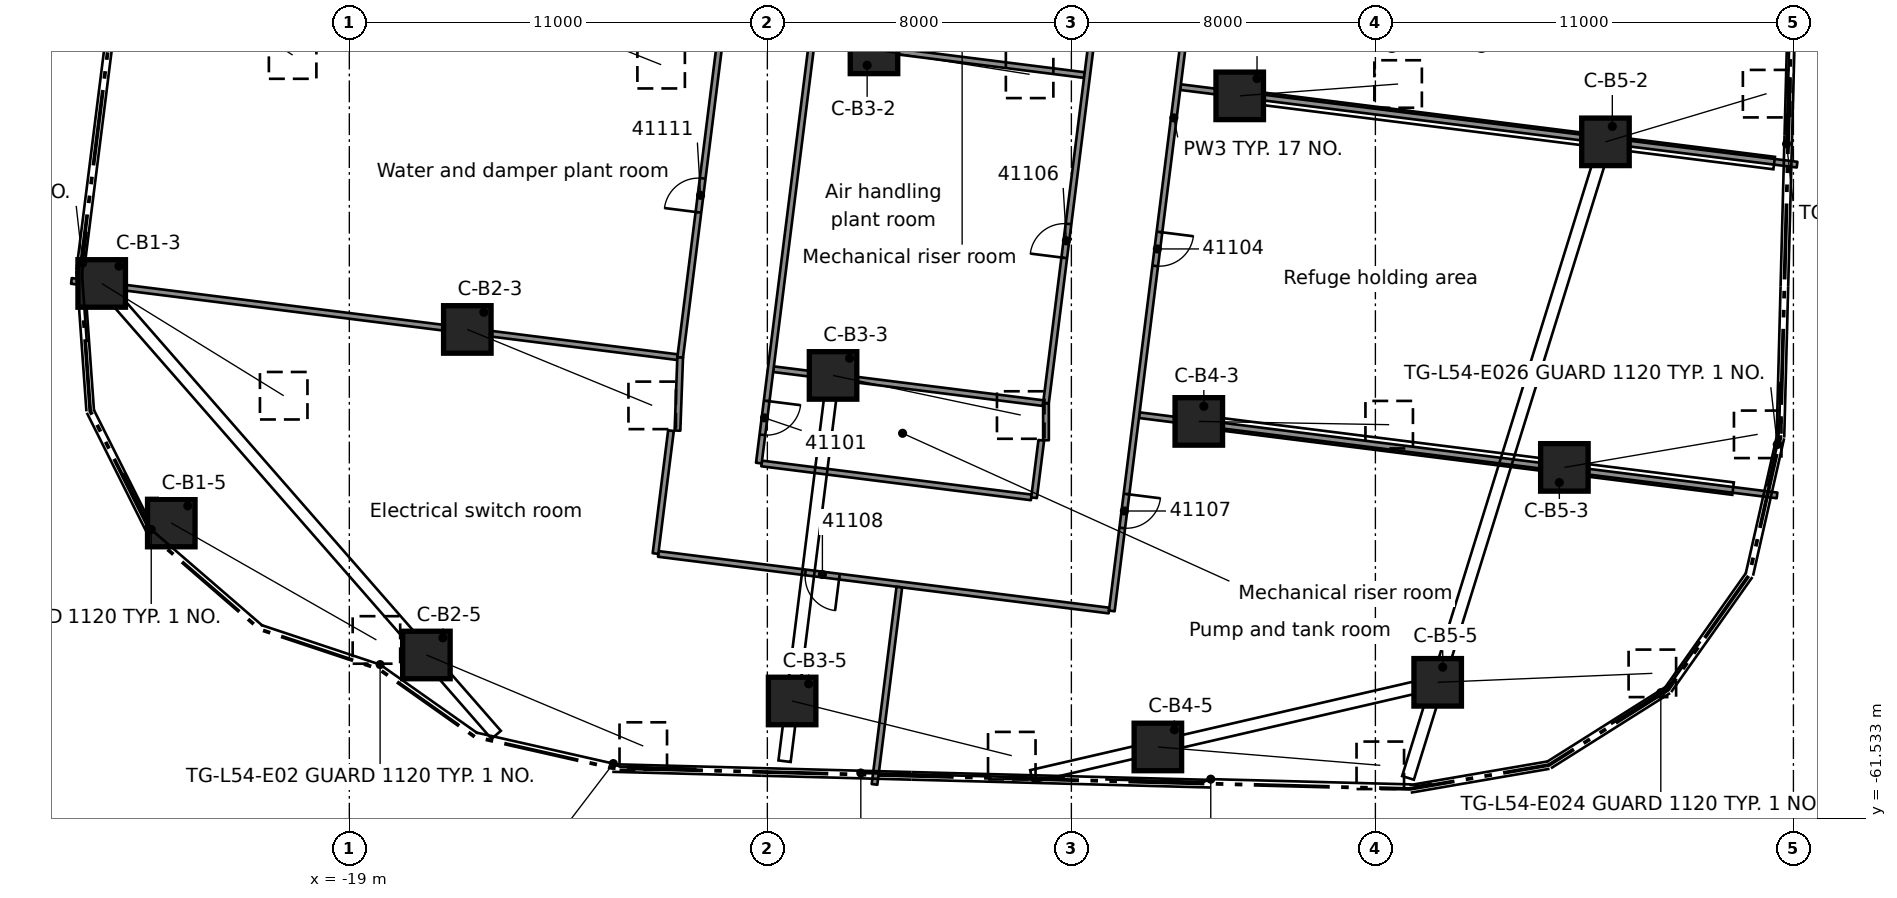
"""IFC4 building model, lengths in metres.
Left out: names, types, materials, properties, quantities, classifications, styles, units other than length and angle.
Written with IfcOpenShell. Run it as: python <this file> out.ifc"""

import sys

from ifc_helpers import new_model, si_unit, direction, frame, frame_2d, origin, origin_2d, place, context, subcontext, project, spatial, rectangle, extrude, element, fill, save


model = new_model("IFC4")
c1 = context("Model", 3, precision=1e-05, world=origin(), true_north=direction((0.0, 1.0)))
c2 = subcontext(c1, "Body", "Model", "MODEL_VIEW")
j1 = project(units=[si_unit("LENGTHUNIT", "METRE"), si_unit("PLANEANGLEUNIT", "RADIAN")], contexts=[c1])
p1 = place(None, origin())
s1 = spatial("IfcSite", under=j1, at=p1, CompositionType="ELEMENT")
p2 = place(p1, origin())
s2 = spatial("IfcBuilding", under=s1, at=p2, CompositionType="ELEMENT")
p3 = place(p2, frame((0.0, 0.0, 206.1)))
s3 = spatial("IfcBuildingStorey", under=s2, at=p3, CompositionType="ELEMENT", Elevation=206.1)
p4 = place(p3, frame((-24.442, -38.888, 0.507), z_axis=(0.681472154292, -0.44100460198, 0.584046782336), x_axis=(0.543296460318, 0.839540919912, 0.0)))
e1 = element("IfcColumn", 1, at=p4, inside=s3, PredefinedType="COLUMN", context=c2, shape_type="SweptSolid", body=[
    extrude(rectangle(XDim=1.25, YDim=1.25, at=origin_2d()), origin(), (0.0, 0.0, 1.0), 5.796),
])
p5 = place(p3, frame((-25.516, -47.454, 0.538), z_axis=(0.732821218952, -0.451998568928, 0.50859645569), x_axis=(0.524966240831, 0.851123049851, 0.0)))
e2 = element("IfcColumn", 2, at=p5, inside=s3, PredefinedType="COLUMN", context=c2, shape_type="SweptSolid", body=[
    extrude(rectangle(XDim=1.25, YDim=1.25, at=origin_2d()), origin(), (0.0, 0.0, 1.0), 6.535),
])
p6 = place(p3, frame((-23.685, -53.758, 0.552), z_axis=(0.767524718549, -0.437360648077, 0.468637887852), x_axis=(0.495093298887, 0.86883981573, 0.0)))
e3 = element("IfcColumn", 3, at=p6, inside=s3, PredefinedType="COLUMN", context=c2, shape_type="SweptSolid", body=[
    extrude(rectangle(XDim=1.25, YDim=1.25, at=origin_2d()), origin(), (0.0, 0.0, 1.0), 7.033),
])
p7 = place(p3, frame((-14.818, -40.098, 0.49), z_axis=(0.729256121649, -0.29003851091, 0.619728304361), x_axis=(0.369562231152, 0.929205982173, 0.0)))
e4 = element("IfcColumn", 4, at=p7, inside=s3, PredefinedType="COLUMN", context=c2, shape_type="SweptSolid", body=[
    extrude(rectangle(XDim=1.25, YDim=1.25, at=origin_2d()), origin(), (0.0, 0.0, 1.0), 5.517),
])
p8 = place(p3, frame((-15.895, -48.664, 0.527), z_axis=(0.780516487065, -0.320557380948, 0.536690766587), x_axis=(0.379906795969, 0.925024770683, 0.0)))
e5 = element("IfcColumn", 5, at=p8, inside=s3, PredefinedType="COLUMN", context=c2, shape_type="SweptSolid", body=[
    extrude(rectangle(XDim=1.25, YDim=1.25, at=origin_2d()), origin(), (0.0, 0.0, 1.0), 6.233),
])
p9 = place(p3, frame((-16.972, -57.23, 0.552), z_axis=(0.813793611943, -0.34165684923, 0.470117596495), x_axis=(0.387101045931, 0.922037298724, 0.0)))
e6 = element("IfcColumn", 6, at=p9, inside=s3, PredefinedType="COLUMN", context=c2, shape_type="SweptSolid", body=[
    extrude(rectangle(XDim=1.25, YDim=1.25, at=origin_2d()), origin(), (0.0, 0.0, 1.0), 7.013),
])
p10 = place(p3, frame((-5.194, -41.308, 0.481), z_axis=(0.760399313184, -0.119547665228, 0.638358238177), x_axis=(0.155309269124, 0.987865897237, 0.0)))
e7 = element("IfcColumn", 7, at=p10, inside=s3, PredefinedType="COLUMN", context=c2, shape_type="SweptSolid", body=[
    extrude(rectangle(XDim=1.25, YDim=1.25, at=origin_2d()), origin(), (0.0, 0.0, 1.0), 5.385),
])
p11 = place(p3, frame((-6.271, -49.874, 0.52), z_axis=(0.814502781534, -0.171872731711, 0.554116398393), x_axis=(0.206468811523, 0.978453182257, 0.0)))
e8 = element("IfcColumn", 8, at=p11, inside=s3, PredefinedType="COLUMN", context=c2, shape_type="SweptSolid", body=[
    extrude(rectangle(XDim=1.25, YDim=1.25, at=origin_2d()), origin(), (0.0, 0.0, 1.0), 6.062),
])
p12 = place(p3, frame((-7.348, -58.44, 0.546), z_axis=(0.84837700883, -0.211216274818, 0.485431906801), x_axis=(0.241590347194, 0.970378330417, 0.0)))
e9 = element("IfcColumn", 9, at=p12, inside=s3, PredefinedType="COLUMN", context=c2, shape_type="SweptSolid", body=[
    extrude(rectangle(XDim=1.25, YDim=1.25, at=origin_2d()), origin(), (0.0, 0.0, 1.0), 6.813),
])
p13 = place(p3, frame((4.43, -42.518, 0.483), z_axis=(0.770496575996, 0.057678925968, 0.634829243086), x_axis=(-0.074650542849, 0.997209755494, 0.0)))
e10 = element("IfcColumn", 10, at=p13, inside=s3, PredefinedType="COLUMN", context=c2, shape_type="SweptSolid", body=[
    extrude(rectangle(XDim=1.25, YDim=1.25, at=origin_2d()), origin(), (0.0, 0.0, 1.0), 5.409),
])
p14 = place(p3, frame((3.353, -51.084, 0.519), z_axis=(0.830275198179, -0.014241843466, 0.557171665812), x_axis=(0.017150637239, 0.999852917004, 0.0)))
e11 = element("IfcColumn", 11, at=p14, inside=s3, PredefinedType="COLUMN", context=c2, shape_type="SweptSolid", body=[
    extrude(rectangle(XDim=1.25, YDim=1.25, at=origin_2d()), origin(), (0.0, 0.0, 1.0), 6.034),
])
p15 = place(p3, frame((2.276, -59.65, 0.544), z_axis=(0.868130955157, -0.071662265799, 0.491134568482), x_axis=(0.082267943599, 0.996610247517, 0.0)))
e12 = element("IfcColumn", 12, at=p15, inside=s3, PredefinedType="COLUMN", context=c2, shape_type="SweptSolid", body=[
    extrude(rectangle(XDim=1.25, YDim=1.25, at=origin_2d()), origin(), (0.0, 0.0, 1.0), 6.742),
])
p16 = place(p3, frame((14.054, -43.728, 0.495), z_axis=(0.759016145733, 0.22694892988, 0.610236571948), x_axis=(-0.286472377914, 0.958088501492, 0.0)))
e13 = element("IfcColumn", 13, at=p16, inside=s3, PredefinedType="COLUMN", context=c2, shape_type="SweptSolid", body=[
    extrude(rectangle(XDim=1.25, YDim=1.25, at=origin_2d()), origin(), (0.0, 0.0, 1.0), 5.587),
])
p17 = place(p3, frame((12.973, -52.294, 0.524), z_axis=(0.826674052824, 0.141356224515, 0.544636051119), x_axis=(-0.168547583894, 0.985693518272, 0.0)))
e14 = element("IfcColumn", 14, at=p17, inside=s3, PredefinedType="COLUMN", context=c2, shape_type="SweptSolid", body=[
    extrude(rectangle(XDim=1.25, YDim=1.25, at=origin_2d()), origin(), (0.0, 0.0, 1.0), 6.154),
])
p18 = place(p3, frame((9.639, -57.949, 0.539), z_axis=(0.86142718096, 0.035999830761, 0.50660361634), x_axis=(-0.041754469989, 0.99912790184, 0.0)))
e15 = element("IfcColumn", 15, at=p18, inside=s3, PredefinedType="COLUMN", context=c2, shape_type="SweptSolid", body=[
    extrude(rectangle(XDim=1.25, YDim=1.25, at=origin_2d()), origin(), (0.0, 0.0, 1.0), 6.558),
])
p19 = place(p3, frame((0.989, -56.06, 0.0), z_axis=(0.0, 0.0, 1.0), x_axis=(-0.992206680217, 0.124602984447, 0.0)))
e16 = element("IfcWall", 16, at=p19, inside=s3, PredefinedType="PARTITIONING", context=c2, shape_type="SweptSolid", body=[
    extrude(rectangle(XDim=11.95, YDim=0.15, at=frame_2d((5.975, 0.0))), origin(), (0.0, 0.0, 1.0), 3.98),
])
p20 = place(p19, frame((7.15, 0.0, 0.0)))
e17 = element("IfcOpeningElement", 17, at=p20, cuts=e16, PredefinedType="OPENING", context=c2, shape_type="SweptSolid", body=[
    extrude(rectangle(XDim=0.9, YDim=2.1, at=frame_2d((0.45, 1.05))), frame((0.0, 0.085, 0.0), z_axis=(0.0, -1.0, 0.0), x_axis=(1.0, 0.0, 0.0)), (0.0, 0.0, 1.0), 0.17),
])
p21 = place(p3, frame((-8.15, -52.19, 0.0), z_axis=(0.0, 0.0, 1.0), x_axis=(0.992168754775, -0.124904611796, 0.0)))
e18 = element("IfcWall", 18, at=p21, inside=s3, PredefinedType="PARTITIONING", context=c2, shape_type="SweptSolid", body=[
    extrude(rectangle(XDim=7.15, YDim=0.15, at=frame_2d((3.575, 0.0))), origin(), (0.0, 0.0, 1.0), 3.98),
])
p22 = place(p3, frame((-26.313, -47.387, 0.0), z_axis=(0.0, 0.0, 1.0), x_axis=(0.992178228876, -0.124829332068, 0.0)))
e19 = element("IfcWall", 19, at=p22, inside=s3, PredefinedType="PARTITIONING", context=c2, shape_type="SweptSolid", body=[
    extrude(rectangle(XDim=16.071, YDim=0.15, at=frame_2d((8.035, 0.0))), origin(), (0.0, 0.0, 1.0), 3.98),
])
p23 = place(p3, frame((-7.838, -49.71, 0.0), z_axis=(0.0, 0.0, 1.0), x_axis=(0.992173014732, -0.124870768549, 0.0)))
e20 = element("IfcWall", 20, at=p23, inside=s3, PredefinedType="PARTITIONING", context=c2, shape_type="SweptSolid", body=[
    extrude(rectangle(XDim=7.152, YDim=0.15, at=frame_2d((3.576, 0.0))), origin(), (0.0, 0.0, 1.0), 3.98),
])
p24 = place(p3, frame((1.787, -50.92, 0.0), z_axis=(0.0, 0.0, 1.0), x_axis=(0.992180531957, -0.12481102518, 0.0)))
e21 = element("IfcWall", 21, at=p24, inside=s3, PredefinedType="PARTITIONING", context=c2, shape_type="SweptSolid", body=[
    extrude(rectangle(XDim=16.914, YDim=0.15, at=frame_2d((8.457, 0.0))), origin(), (0.0, 0.0, 1.0), 3.98),
])
p25 = place(p3, frame((-6.752, -41.078, 0.0), z_axis=(0.0, 0.0, 1.0), x_axis=(0.992168754775, -0.124904611796, 0.0)))
e22 = element("IfcWall", 22, at=p25, inside=s3, PredefinedType="PARTITIONING", context=c2, shape_type="SweptSolid", body=[
    extrude(rectangle(XDim=7.15, YDim=0.15, at=frame_2d((3.575, 0.0))), origin(), (0.0, 0.0, 1.0), 3.98),
])
p26 = place(p3, frame((2.872, -42.288, 0.0), z_axis=(0.0, 0.0, 1.0), x_axis=(0.992188726877, -0.124745862686, 0.0)))
e23 = element("IfcWall", 23, at=p26, inside=s3, PredefinedType="PARTITIONING", context=c2, shape_type="SweptSolid", body=[
    extrude(rectangle(XDim=16.352, YDim=0.15, at=frame_2d((8.176, 0.0))), origin(), (0.0, 0.0, 1.0), 3.98),
])
p27 = place(p3, frame((-10.943, -54.561, 0.0), z_axis=(0.0, 0.0, 1.0), x_axis=(0.124928843821, 0.992165703893, 0.0)))
e24 = element("IfcWall", 24, at=p27, inside=s3, PredefinedType="PARTITIONING", context=c2, shape_type="SweptSolid", body=[
    extrude(rectangle(XDim=3.26, YDim=0.15, at=frame_2d((1.63, 0.0))), origin(), (0.0, 0.0, 1.0), 3.98),
])
p28 = place(p3, frame((4.328, -30.123, 0.0), z_axis=(0.0, 0.0, 1.0), x_axis=(-0.124803349917, -0.992181497434, 0.0)))
e25 = element("IfcWall", 25, at=p28, inside=s3, PredefinedType="PARTITIONING", context=c2, shape_type="SweptSolid", body=[
    extrude(rectangle(XDim=26.153, YDim=0.15, at=frame_2d((13.076, 0.0))), origin(), (0.0, 0.0, 1.0), 3.98),
])
p29 = place(p28, frame((2.946, 0.0, 0.0)))
e26 = element("IfcOpeningElement", 26, at=p29, cuts=e25, PredefinedType="OPENING", context=c2, shape_type="SweptSolid", body=[
    extrude(rectangle(XDim=0.9, YDim=2.1, at=frame_2d((0.45, 1.05))), frame((0.0, 0.085, 0.0), z_axis=(0.0, -1.0, 0.0), x_axis=(1.0, 0.0, 0.0)), (0.0, 0.0, 1.0), 0.17),
])
p30 = place(p28, frame((9.803, 0.0, 0.0)))
e27 = element("IfcOpeningElement", 27, at=p30, cuts=e25, PredefinedType="OPENING", context=c2, shape_type="SweptSolid", body=[
    extrude(rectangle(XDim=0.9, YDim=2.1, at=frame_2d((0.45, 1.05))), frame((0.0, 0.085, 0.0), z_axis=(0.0, -1.0, 0.0), x_axis=(1.0, 0.0, 0.0)), (0.0, 0.0, 1.0), 0.17),
])
p31 = place(p28, frame((16.102, 0.0, 0.0)))
e28 = element("IfcOpeningElement", 28, at=p31, cuts=e25, PredefinedType="OPENING", context=c2, shape_type="SweptSolid", body=[
    extrude(rectangle(XDim=0.9, YDim=2.1, at=frame_2d((0.45, 1.05))), frame((0.0, 0.085, 0.0), z_axis=(0.0, -1.0, 0.0), x_axis=(1.0, 0.0, 0.0)), (0.0, 0.0, 1.0), 0.17),
])
p32 = place(p28, frame((23.052, 0.0, 0.0)))
e29 = element("IfcOpeningElement", 29, at=p32, cuts=e25, PredefinedType="OPENING", context=c2, shape_type="SweptSolid", body=[
    extrude(rectangle(XDim=0.9, YDim=2.1, at=frame_2d((0.45, 1.05))), frame((0.0, 0.085, 0.0), z_axis=(0.0, -1.0, 0.0), x_axis=(1.0, 0.0, 0.0)), (0.0, 0.0, 1.0), 0.17),
])
p33 = place(p28, frame((0.2, 0.0, 0.0)))
e30 = element("IfcOpeningElement", 30, at=p33, cuts=e25, PredefinedType="OPENING", context=c2, shape_type="SweptSolid", body=[
    extrude(rectangle(XDim=0.9, YDim=2.1, at=frame_2d((0.45, 1.05))), frame((0.0, 0.085, 0.0), z_axis=(0.0, -1.0, 0.0), x_axis=(1.0, 0.0, 0.0)), (0.0, 0.0, 1.0), 0.17),
])
p34 = place(p3, frame((-0.982, -53.092, 0.0), z_axis=(0.0, 0.0, 1.0), x_axis=(0.12472529348, 0.992191312785, 0.0)))
e31 = element("IfcWall", 31, at=p34, inside=s3, PredefinedType="PARTITIONING", context=c2, shape_type="SweptSolid", body=[
    extrude(rectangle(XDim=1.523, YDim=0.15, at=frame_2d((0.761, 0.0))), origin(), (0.0, 0.0, 1.0), 3.98),
])
p35 = place(p3, frame((-0.668, -50.6, 0.0), z_axis=(0.0, 0.0, 1.0), x_axis=(0.124761144716, 0.99218680538, 0.0)))
e32 = element("IfcWall", 32, at=p35, inside=s3, PredefinedType="PARTITIONING", context=c2, shape_type="SweptSolid", body=[
    extrude(rectangle(XDim=17.745, YDim=0.15, at=frame_2d((8.873, 0.0))), origin(), (0.0, 0.0, 1.0), 3.98),
])
p36 = place(p35, frame((15.588, 0.0, 0.0)))
e33 = element("IfcOpeningElement", 33, at=p36, cuts=e32, PredefinedType="OPENING", context=c2, shape_type="SweptSolid", body=[
    extrude(rectangle(XDim=0.9, YDim=2.1, at=frame_2d((0.45, 1.05))), frame((0.0, 0.085, 0.0), z_axis=(0.0, -1.0, 0.0), x_axis=(1.0, 0.0, 0.0)), (0.0, 0.0, 1.0), 0.17),
])
p37 = place(p35, frame((3.85, 0.0, 0.0)))
e34 = element("IfcOpeningElement", 34, at=p37, cuts=e32, PredefinedType="OPENING", context=c2, shape_type="SweptSolid", body=[
    extrude(rectangle(XDim=0.9, YDim=2.1, at=frame_2d((0.45, 1.05))), frame((0.0, 0.085, 0.0), z_axis=(0.0, -1.0, 0.0), x_axis=(1.0, 0.0, 0.0)), (0.0, 0.0, 1.0), 0.17),
])
p38 = place(p3, frame((-5.18, -60.635, 0.0), z_axis=(0.0, 0.0, 1.0), x_axis=(0.124781334236, 0.992184266468, 0.0)))
e35 = element("IfcWall", 35, at=p38, inside=s3, PredefinedType="PARTITIONING", context=c2, shape_type="SweptSolid", body=[
    extrude(rectangle(XDim=5.232, YDim=0.15, at=frame_2d((2.616, 0.0))), origin(), (0.0, 0.0, 1.0), 3.98),
])
p39 = place(p3, frame((-5.498, -30.515, 0.0), z_axis=(0.0, 0.0, 1.0), x_axis=(-0.12483829345, -0.992177101373, 0.0)))
e36 = element("IfcWall", 36, at=p39, inside=s3, PredefinedType="PARTITIONING", context=c2, shape_type="SweptSolid", body=[
    extrude(rectangle(XDim=21.837, YDim=0.15, at=frame_2d((10.918, 0.0))), origin(), (0.0, 0.0, 1.0), 3.98),
])
p40 = place(p39, frame((8.188, 0.0, 0.0)))
e37 = element("IfcOpeningElement", 37, at=p40, cuts=e36, PredefinedType="OPENING", context=c2, shape_type="SweptSolid", body=[
    extrude(rectangle(XDim=0.9, YDim=2.1, at=frame_2d((0.45, 1.05))), frame((0.0, 0.085, 0.0), z_axis=(0.0, -1.0, 0.0), x_axis=(1.0, 0.0, 0.0)), (0.0, 0.0, 1.0), 0.17),
])
p41 = place(p39, frame((20.187, 0.0, 0.0)))
e38 = element("IfcOpeningElement", 38, at=p41, cuts=e36, PredefinedType="OPENING", context=c2, shape_type="SweptSolid", body=[
    extrude(rectangle(XDim=0.9, YDim=2.1, at=frame_2d((0.45, 1.05))), frame((0.0, 0.085, 0.0), z_axis=(0.0, -1.0, 0.0), x_axis=(1.0, 0.0, 0.0)), (0.0, 0.0, 1.0), 0.17),
])
p42 = place(p3, frame((-10.294, -49.402, 0.0), z_axis=(0.0, 0.0, 1.0), x_axis=(0.124690335959, 0.992195706561, 0.0)))
e39 = element("IfcWall", 39, at=p42, inside=s3, PredefinedType="PARTITIONING", context=c2, shape_type="SweptSolid", body=[
    extrude(rectangle(XDim=18.791, YDim=0.15, at=frame_2d((9.396, 0.0))), origin(), (0.0, 0.0, 1.0), 3.98),
])
p43 = place(p42, frame((15.85, 0.0, 0.0)))
e40 = element("IfcOpeningElement", 40, at=p43, cuts=e39, PredefinedType="OPENING", context=c2, shape_type="SweptSolid", body=[
    extrude(rectangle(XDim=0.9, YDim=2.1, at=frame_2d((0.45, 1.05))), frame((0.0, 0.085, 0.0), z_axis=(0.0, -1.0, 0.0), x_axis=(1.0, 0.0, 0.0)), (0.0, 0.0, 1.0), 0.17),
])
p44 = place(p42, frame((11.05, 0.0, 0.0)))
e41 = element("IfcOpeningElement", 41, at=p44, cuts=e39, PredefinedType="OPENING", context=c2, shape_type="SweptSolid", body=[
    extrude(rectangle(XDim=0.9, YDim=2.1, at=frame_2d((0.45, 1.05))), frame((0.0, 0.085, 0.0), z_axis=(0.0, -1.0, 0.0), x_axis=(1.0, 0.0, 0.0)), (0.0, 0.0, 1.0), 0.17),
])
p45 = place(p42, frame((3.85, 0.0, 0.0)))
e42 = element("IfcOpeningElement", 42, at=p45, cuts=e39, PredefinedType="OPENING", context=c2, shape_type="SweptSolid", body=[
    extrude(rectangle(XDim=0.9, YDim=2.1, at=frame_2d((0.45, 1.05))), frame((0.0, 0.085, 0.0), z_axis=(0.0, -1.0, 0.0), x_axis=(1.0, 0.0, 0.0)), (0.0, 0.0, 1.0), 0.17),
])
p46 = place(p3, frame((-10.294, -49.402, 0.0), z_axis=(0.0, 0.0, 1.0), x_axis=(-0.03690377889, -0.999318823551, 0.0)))
e43 = element("IfcWall", 43, at=p46, inside=s3, PredefinedType="PARTITIONING", context=c2, shape_type="SweptSolid", body=[
    extrude(rectangle(XDim=1.925, YDim=0.15, at=frame_2d((0.962, 0.0))), origin(), (0.0, 0.0, 1.0), 3.98),
])
p47 = place(p3, frame((-0.668, -51.58, 0.0), z_axis=(0.0, 0.0, 1.0), x_axis=(0.0, 1.0, 0.0)))
e44 = element("IfcWall", 44, at=p47, inside=s3, PredefinedType="PARTITIONING", context=c2, shape_type="SweptSolid", body=[
    extrude(rectangle(XDim=0.968, YDim=0.15, at=frame_2d((0.484, 0.0))), origin(), (0.0, 0.0, 1.0), 3.98),
])
p48 = place(p41, origin())
e45 = element("IfcDoor", 45, at=p48, inside=s3, OperationType="SINGLE_SWING_RIGHT", PredefinedType="DOOR", context=c2, shape_type="SweptSolid", body=[
    extrude(rectangle(XDim=0.9, YDim=2.1, at=frame_2d((0.45, 1.05))), frame((0.0, 0.025, 0.0), z_axis=(0.0, -1.0, 0.0), x_axis=(1.0, 0.0, 0.0)), (0.0, 0.0, 1.0), 0.05),
])
fill(e38, e45)
p49 = place(p31, origin())
e46 = element("IfcDoor", 46, at=p49, inside=s3, OperationType="SINGLE_SWING_RIGHT", PredefinedType="DOOR", context=c2, shape_type="SweptSolid", body=[
    extrude(rectangle(XDim=0.9, YDim=2.1, at=frame_2d((0.45, 1.05))), frame((0.0, 0.025, 0.0), z_axis=(0.0, -1.0, 0.0), x_axis=(1.0, 0.0, 0.0)), (0.0, 0.0, 1.0), 0.05),
])
fill(e28, e46)
p50 = place(p37, origin())
e47 = element("IfcDoor", 47, at=p50, inside=s3, OperationType="SINGLE_SWING_LEFT", PredefinedType="DOOR", context=c2, shape_type="SweptSolid", body=[
    extrude(rectangle(XDim=0.9, YDim=2.1, at=frame_2d((0.45, 1.05))), frame((0.0, 0.025, 0.0), z_axis=(0.0, -1.0, 0.0), x_axis=(1.0, 0.0, 0.0)), (0.0, 0.0, 1.0), 0.05),
])
fill(e34, e47)
p51 = place(p32, origin())
e48 = element("IfcDoor", 48, at=p51, inside=s3, OperationType="SINGLE_SWING_RIGHT", PredefinedType="DOOR", context=c2, shape_type="SweptSolid", body=[
    extrude(rectangle(XDim=0.9, YDim=2.1, at=frame_2d((0.45, 1.05))), frame((0.0, 0.025, 0.0), z_axis=(0.0, -1.0, 0.0), x_axis=(1.0, 0.0, 0.0)), (0.0, 0.0, 1.0), 0.05),
])
fill(e29, e48)
p52 = place(p20, origin())
e49 = element("IfcDoor", 49, at=p52, inside=s3, OperationType="SINGLE_SWING_RIGHT", PredefinedType="DOOR", context=c2, shape_type="SweptSolid", body=[
    extrude(rectangle(XDim=0.9, YDim=2.1, at=frame_2d((0.45, 1.05))), frame((0.0, 0.025, 0.0), z_axis=(0.0, -1.0, 0.0), x_axis=(1.0, 0.0, 0.0)), (0.0, 0.0, 1.0), 0.05),
])
fill(e17, e49)
p53 = place(p45, origin())
e50 = element("IfcDoor", 50, at=p53, inside=s3, OperationType="SINGLE_SWING_LEFT", PredefinedType="DOOR", context=c2, shape_type="SweptSolid", body=[
    extrude(rectangle(XDim=0.9, YDim=2.1, at=frame_2d((0.45, 1.05))), frame((0.0, 0.025, 0.0), z_axis=(0.0, -1.0, 0.0), x_axis=(1.0, 0.0, 0.0)), (0.0, 0.0, 1.0), 0.05),
])
fill(e42, e50)
save(model, sys.argv[1])
